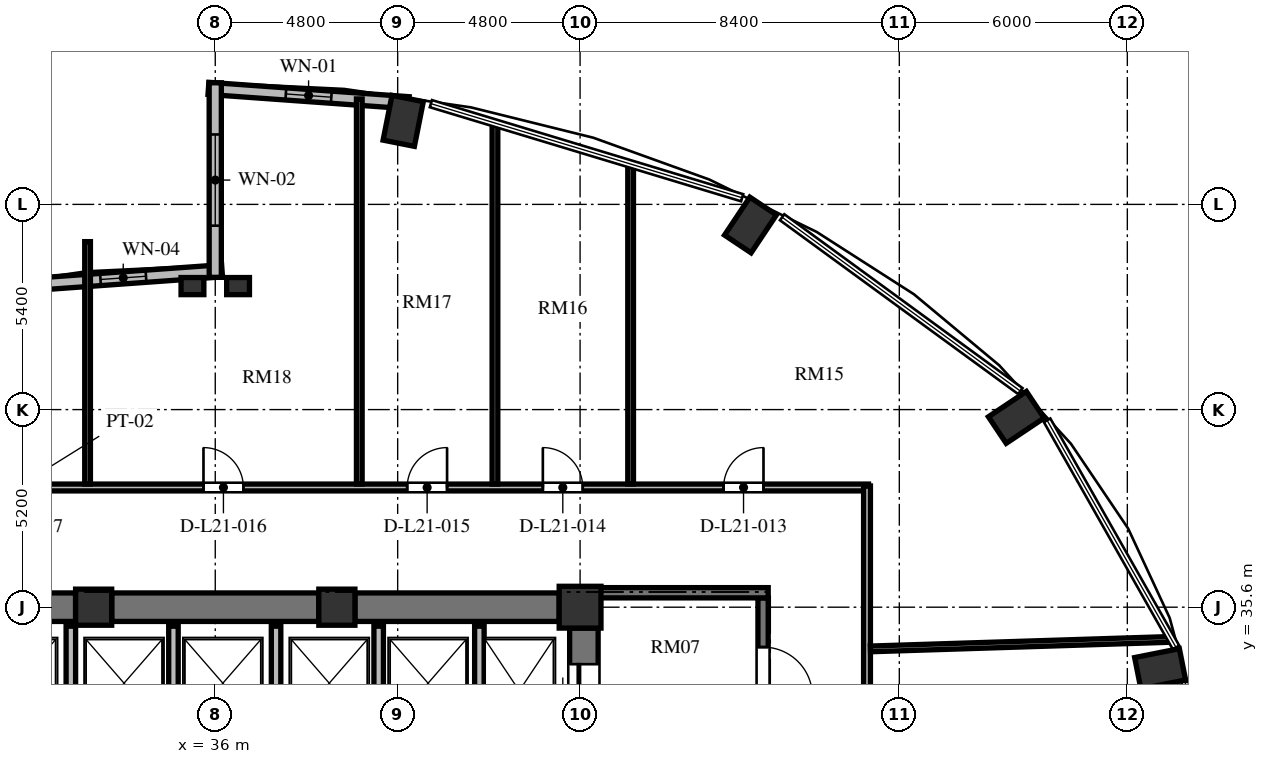
"""IFC4 building model, lengths in metres.
Left out: names, types, materials, properties, quantities, classifications, styles, units other than length and angle.
Written with IfcOpenShell. Run it as: python <this file> out.ifc"""

import sys

from ifc_helpers import new_model, si_unit, direction, frame, frame_2d, origin, origin_2d, place, context, subcontext, project, spatial, rectangle, extrude, element, fill, save


model = new_model("IFC4")
c1 = context("Model", 3, precision=1e-05, world=origin(), true_north=direction((0.0, 1.0)))
c2 = subcontext(c1, "Body", "Model", "MODEL_VIEW")
j1 = project(units=[si_unit("LENGTHUNIT", "METRE"), si_unit("PLANEANGLEUNIT", "RADIAN")], contexts=[c1])
p1 = place(None, origin())
s1 = spatial("IfcSite", under=j1, at=p1, CompositionType="ELEMENT")
p2 = place(p1, origin())
s2 = spatial("IfcBuilding", under=s1, at=p2, CompositionType="ELEMENT")
p3 = place(p2, frame((0.0, 0.0, 85.392)))
s3 = spatial("IfcBuildingStorey", under=s2, at=p3, CompositionType="ELEMENT", Elevation=85.392)
for number, where, z_axis, x_axis in (
    (1, (60.863, 33.98, 0.0), (0.0, 0.0, 1.0), (0.981, 0.195, 0.0)),
    (2, (57.078, 40.595, 0.0), (0.0, 0.0, 1.0), (0.831, 0.556, 0.0)),
    (3, (50.084, 45.657, 0.0), (0.0, 0.0, 1.0), (0.556, 0.831, 0.0)),
    (4, (40.946, 48.397, 0.0), (0.0, 0.0, 1.0), (0.195, 0.981, 0.0)),
):
    element("IfcColumn", number, at=place(p3, frame(where, z_axis=z_axis, x_axis=x_axis)), inside=s3, PredefinedType="COLUMN", context=c2, shape_type="SweptSolid", body=[
        extrude(rectangle(XDim=1.2, YDim=0.84, at=origin_2d()), origin(), (0.0, 0.0, 1.0), 3.648),
    ])
p4 = place(p3, frame((45.6, 35.6, 0.0), z_axis=(0.0, 0.0, 1.0), x_axis=(1.0, 0.0, 0.0)))
e5 = element("IfcColumn", 5, at=p4, inside=s3, PredefinedType="COLUMN", context=c2, shape_type="SweptSolid", body=[
    extrude(rectangle(XDim=1.1, YDim=1.1, at=origin_2d()), origin(), (0.0, 0.0, 1.0), 3.648),
])
for number, where, z_axis, x_axis in (
    (6, (39.2, 35.6, 0.0), (0.0, 0.0, 1.0), (1.0, 0.0, 0.0)),
    (7, (32.8, 35.6, 0.0), (0.0, 0.0, 1.0), (1.0, 0.0, 0.0)),
):
    element("IfcColumn", number, at=place(p3, frame(where, z_axis=z_axis, x_axis=x_axis)), inside=s3, PredefinedType="COLUMN", context=c2, shape_type="SweptSolid", body=[
        extrude(rectangle(XDim=0.95, YDim=0.95, at=origin_2d()), origin(), (0.0, 0.0, 1.0), 3.648),
    ])
for number, where, z_axis, x_axis in (
    (8, (35.4, 44.05, 0.0), (0.0, 0.0, 1.0), (1.0, 0.0, 0.0)),
    (9, (36.6, 44.05, 0.0), (0.0, 0.0, 1.0), (1.0, 0.0, 0.0)),
):
    element("IfcColumn", number, at=place(p3, frame(where, z_axis=z_axis, x_axis=x_axis)), inside=s3, PredefinedType="PILASTER", context=c2, shape_type="SweptSolid", body=[
        extrude(rectangle(XDim=0.6, YDim=0.45, at=origin_2d()), origin(), (0.0, 0.0, 1.0), 3.648),
    ])
p5 = place(p3, frame((45.7, 20.95, 0.0), z_axis=(0.0, 0.0, 1.0), x_axis=(0.0, 1.0, 0.0)))
e10 = element("IfcWall", 10, at=p5, inside=s3, PredefinedType="SHEAR", context=c2, shape_type="SweptSolid", body=[
    extrude(rectangle(XDim=14.1, YDim=0.75, at=frame_2d((7.05, 0.0))), origin(), (0.0, 0.0, 1.0), 3.648),
])
p6 = place(p5, frame((11.75, 0.0, 0.0)))
e11 = element("IfcOpeningElement", 11, at=p6, cuts=e10, PredefinedType="OPENING", context=c2, shape_type="SweptSolid", body=[
    extrude(rectangle(XDim=1.4, YDim=2.3, at=frame_2d((0.7, 1.15))), frame((0.0, 0.385, 0.0), z_axis=(0.0, -1.0, 0.0), x_axis=(1.0, 0.0, 0.0)), (0.0, 0.0, 1.0), 0.77),
])
p7 = place(p5, frame((0.95, 0.0, 0.0)))
e12 = element("IfcOpeningElement", 12, at=p7, cuts=e10, PredefinedType="OPENING", context=c2, shape_type="SweptSolid", body=[
    extrude(rectangle(XDim=1.4, YDim=2.3, at=frame_2d((0.7, 1.15))), frame((0.0, 0.385, 0.0), z_axis=(0.0, -1.0, 0.0), x_axis=(1.0, 0.0, 0.0)), (0.0, 0.0, 1.0), 0.77),
])
p8 = place(p3, frame((26.95, 35.6, 0.0), z_axis=(0.0, 0.0, 1.0), x_axis=(1.0, 0.0, 0.0)))
e13 = element("IfcWall", 13, at=p8, inside=s3, PredefinedType="SHEAR", context=c2, shape_type="SweptSolid", body=[
    extrude(rectangle(XDim=5.375, YDim=0.75, at=frame_2d((2.688, 0.0))), origin(), (0.0, 0.0, 1.0), 3.648),
])
p9 = place(p3, frame((33.275, 35.6, 0.0), z_axis=(0.0, 0.0, 1.0), x_axis=(1.0, 0.0, 0.0)))
e14 = element("IfcWall", 14, at=p9, inside=s3, PredefinedType="SHEAR", context=c2, shape_type="SweptSolid", body=[
    extrude(rectangle(XDim=5.45, YDim=0.75, at=frame_2d((2.725, 0.0))), origin(), (0.0, 0.0, 1.0), 3.648),
])
p10 = place(p3, frame((39.675, 35.6, 0.0), z_axis=(0.0, 0.0, 1.0), x_axis=(1.0, 0.0, 0.0)))
e15 = element("IfcWall", 15, at=p10, inside=s3, PredefinedType="SHEAR", context=c2, shape_type="SweptSolid", body=[
    extrude(rectangle(XDim=5.375, YDim=0.75, at=frame_2d((2.688, 0.0))), origin(), (0.0, 0.0, 1.0), 3.648),
])
p11 = place(p3, frame((41.091, 48.875, 0.0), z_axis=(0.0, 0.0, 1.0), x_axis=(-0.997432364291, 0.071614793619, 0.0)))
e16 = element("IfcWall", 16, at=p11, inside=s3, PredefinedType="SOLIDWALL", context=c2, shape_type="SweptSolid", body=[
    extrude(rectangle(XDim=5.284, YDim=0.32, at=frame_2d((2.642, 0.0))), origin(), (0.0, 0.0, 1.0), 3.428),
])
p12 = place(p11, frame((2.042, 0.0, 0.85)))
e17 = element("IfcOpeningElement", 17, at=p12, cuts=e16, PredefinedType="OPENING", context=c2, shape_type="SweptSolid", body=[
    extrude(rectangle(XDim=1.2, YDim=2.2, at=frame_2d((0.6, 1.1))), frame((0.0, 0.17, 0.0), z_axis=(0.0, -1.0, 0.0), x_axis=(1.0, 0.0, 0.0)), (0.0, 0.0, 1.0), 0.34),
])
p13 = place(p3, frame((36.179, 44.453, 0.0), z_axis=(0.0, 0.0, 1.0), x_axis=(-0.997431890304, -0.071621394884, 0.0)))
e18 = element("IfcWall", 18, at=p13, inside=s3, PredefinedType="SOLIDWALL", context=c2, shape_type="SweptSolid", body=[
    extrude(rectangle(XDim=5.284, YDim=0.32, at=frame_2d((2.642, 0.0))), origin(), (0.0, 0.0, 1.0), 3.428),
])
p14 = place(p13, frame((2.007, 0.0, 0.85)))
e19 = element("IfcOpeningElement", 19, at=p14, cuts=e18, PredefinedType="OPENING", context=c2, shape_type="SweptSolid", body=[
    extrude(rectangle(XDim=1.2, YDim=1.8, at=frame_2d((0.6, 0.9))), frame((0.0, 0.17, 0.0), z_axis=(0.0, -1.0, 0.0), x_axis=(1.0, 0.0, 0.0)), (0.0, 0.0, 1.0), 0.34),
])
p15 = place(p3, frame((36.0, 49.4, 0.0), z_axis=(0.0, 0.0, 1.0), x_axis=(0.0, -1.0, 0.0)))
e20 = element("IfcWall", 20, at=p15, inside=s3, PredefinedType="SOLIDWALL", context=c2, shape_type="SweptSolid", body=[
    extrude(rectangle(XDim=5.12, YDim=0.32, at=frame_2d((2.56, 0.0))), origin(), (0.0, 0.0, 1.0), 3.428),
])
p16 = place(p15, frame((1.36, 0.0, 0.84)))
e21 = element("IfcOpeningElement", 21, at=p16, cuts=e20, PredefinedType="OPENING", context=c2, shape_type="SweptSolid", body=[
    extrude(rectangle(XDim=2.4, YDim=2.04, at=frame_2d((1.2, 1.02))), frame((0.0, 0.17, 0.0), z_axis=(0.0, -1.0, 0.0), x_axis=(1.0, 0.0, 0.0)), (0.0, 0.0, 1.0), 0.34),
])
p17 = place(p3, frame((42.95, 31.92, 0.0), z_axis=(0.0, 0.0, 1.0), x_axis=(0.0, 1.0, 0.0)))
e22 = element("IfcWall", 22, at=p17, inside=s3, PredefinedType="SOLIDWALL", context=c2, shape_type="SweptSolid", body=[
    extrude(rectangle(XDim=3.18, YDim=0.25, at=frame_2d((1.59, 0.0))), origin(), (0.0, 0.0, 1.0), 3.428),
])
for number, where, z_axis, x_axis in (
    (23, (32.2, 32.42, 0.0), (0.0, 0.0, 1.0), (0.0, 1.0, 0.0)),
    (24, (34.9, 32.42, 0.0), (0.0, 0.0, 1.0), (0.0, 1.0, 0.0)),
    (25, (37.6, 32.42, 0.0), (0.0, 0.0, 1.0), (0.0, 1.0, 0.0)),
    (26, (40.3, 32.42, 0.0), (0.0, 0.0, 1.0), (0.0, 1.0, 0.0)),
):
    element("IfcWall", number, at=place(p3, frame(where, z_axis=z_axis, x_axis=x_axis)), inside=s3, PredefinedType="SOLIDWALL", context=c2, shape_type="SweptSolid", body=[
        extrude(rectangle(XDim=2.68, YDim=0.25, at=frame_2d((1.34, 0.0))), origin(), (0.0, 0.0, 1.0), 3.428),
    ])
p18 = place(p3, frame((50.415, 35.845, 0.0), z_axis=(0.0, 0.0, 1.0), x_axis=(0.0, -1.0, 0.0)))
e27 = element("IfcWall", 27, at=p18, inside=s3, PredefinedType="SHEAR", context=c2, shape_type="SweptSolid", body=[
    extrude(rectangle(XDim=15.825, YDim=0.27, at=frame_2d((7.913, 0.0))), origin(), (0.0, 0.0, 1.0), 3.648),
])
p19 = place(p18, frame((4.445, 0.0, 0.0)))
e28 = element("IfcOpeningElement", 28, at=p19, cuts=e27, PredefinedType="OPENING", context=c2, shape_type="SweptSolid", body=[
    extrude(rectangle(XDim=1.2, YDim=2.15, at=frame_2d((0.6, 1.075))), frame((0.0, 0.145, 0.0), z_axis=(0.0, -1.0, 0.0), x_axis=(1.0, 0.0, 0.0)), (0.0, 0.0, 1.0), 0.29),
])
p20 = place(p18, frame((1.295, 0.0, 0.0)))
e29 = element("IfcOpeningElement", 29, at=p20, cuts=e27, PredefinedType="OPENING", context=c2, shape_type="SweptSolid", body=[
    extrude(rectangle(XDim=1.3, YDim=2.2, at=frame_2d((0.65, 1.1))), frame((0.0, 0.145, 0.0), z_axis=(0.0, -1.0, 0.0), x_axis=(1.0, 0.0, 0.0)), (0.0, 0.0, 1.0), 0.29),
])
p21 = place(p18, frame((13.095, 0.0, 0.0)))
e30 = element("IfcOpeningElement", 30, at=p21, cuts=e27, PredefinedType="OPENING", context=c2, shape_type="SweptSolid", body=[
    extrude(rectangle(XDim=1.3, YDim=2.2, at=frame_2d((0.65, 1.1))), frame((0.0, 0.145, 0.0), z_axis=(0.0, -1.0, 0.0), x_axis=(1.0, 0.0, 0.0)), (0.0, 0.0, 1.0), 0.29),
])
p22 = place(p3, frame((46.075, 35.98, 0.0), z_axis=(0.0, 0.0, 1.0), x_axis=(1.0, 0.0, 0.0)))
e31 = element("IfcWall", 31, at=p22, inside=s3, PredefinedType="SHEAR", context=c2, shape_type="SweptSolid", body=[
    extrude(rectangle(XDim=4.475, YDim=0.27, at=frame_2d((2.238, 0.0))), origin(), (0.0, 0.0, 1.0), 3.648),
])
p23 = place(p3, frame((23.31, 38.75, 0.0), z_axis=(0.0, 0.0, 1.0), x_axis=(1.0, 0.0, 0.0)))
e32 = element("IfcWall", 32, at=p23, inside=s3, PredefinedType="PARTITIONING", context=c2, shape_type="SweptSolid", body=[
    extrude(rectangle(XDim=29.88, YDim=0.18, at=frame_2d((14.94, 0.0))), origin(), (0.0, 0.0, 1.0), 3.053),
])
p24 = place(p23, frame((26.066, 0.0, 0.0)))
e33 = element("IfcOpeningElement", 33, at=p24, cuts=e32, PredefinedType="OPENING", context=c2, shape_type="SweptSolid", body=[
    extrude(rectangle(XDim=1.05, YDim=2.15, at=frame_2d((0.525, 1.075))), frame((0.0, 0.1, 0.0), z_axis=(0.0, -1.0, 0.0), x_axis=(1.0, 0.0, 0.0)), (0.0, 0.0, 1.0), 0.2),
])
p25 = place(p23, frame((21.31, 0.0, 0.0)))
e34 = element("IfcOpeningElement", 34, at=p25, cuts=e32, PredefinedType="OPENING", context=c2, shape_type="SweptSolid", body=[
    extrude(rectangle(XDim=1.05, YDim=2.15, at=frame_2d((0.525, 1.075))), frame((0.0, 0.1, 0.0), z_axis=(0.0, -1.0, 0.0), x_axis=(1.0, 0.0, 0.0)), (0.0, 0.0, 1.0), 0.2),
])
p26 = place(p23, frame((17.74, 0.0, 0.0)))
e35 = element("IfcOpeningElement", 35, at=p26, cuts=e32, PredefinedType="OPENING", context=c2, shape_type="SweptSolid", body=[
    extrude(rectangle(XDim=1.05, YDim=2.15, at=frame_2d((0.525, 1.075))), frame((0.0, 0.1, 0.0), z_axis=(0.0, -1.0, 0.0), x_axis=(1.0, 0.0, 0.0)), (0.0, 0.0, 1.0), 0.2),
])
p27 = place(p23, frame((12.38, 0.0, 0.0)))
e36 = element("IfcOpeningElement", 36, at=p27, cuts=e32, PredefinedType="OPENING", context=c2, shape_type="SweptSolid", body=[
    extrude(rectangle(XDim=1.05, YDim=2.15, at=frame_2d((0.525, 1.075))), frame((0.0, 0.1, 0.0), z_axis=(0.0, -1.0, 0.0), x_axis=(1.0, 0.0, 0.0)), (0.0, 0.0, 1.0), 0.2),
])
p28 = place(p23, frame((7.02, 0.0, 0.0)))
e37 = element("IfcOpeningElement", 37, at=p28, cuts=e32, PredefinedType="OPENING", context=c2, shape_type="SweptSolid", body=[
    extrude(rectangle(XDim=1.05, YDim=2.15, at=frame_2d((0.525, 1.075))), frame((0.0, 0.1, 0.0), z_axis=(0.0, -1.0, 0.0), x_axis=(1.0, 0.0, 0.0)), (0.0, 0.0, 1.0), 0.2),
])
p29 = place(p23, frame((2.514, 0.0, 0.0)))
e38 = element("IfcOpeningElement", 38, at=p29, cuts=e32, PredefinedType="OPENING", context=c2, shape_type="SweptSolid", body=[
    extrude(rectangle(XDim=1.05, YDim=2.15, at=frame_2d((0.525, 1.075))), frame((0.0, 0.1, 0.0), z_axis=(0.0, -1.0, 0.0), x_axis=(1.0, 0.0, 0.0)), (0.0, 0.0, 1.0), 0.2),
])
p30 = place(p3, frame((53.15, 38.79, 0.0), z_axis=(0.0, 0.0, 1.0), x_axis=(0.0, -1.0, 0.0)))
e39 = element("IfcWall", 39, at=p30, inside=s3, PredefinedType="PARTITIONING", context=c2, shape_type="SweptSolid", body=[
    extrude(rectangle(XDim=9.43, YDim=0.18, at=frame_2d((4.715, 0.0))), origin(), (0.0, 0.0, 1.0), 3.428),
])
p31 = place(p3, frame((53.24, 34.502, 0.0), z_axis=(0.0, 0.0, 1.0), x_axis=(0.999499445349, 0.031636351679, 0.0)))
e40 = element("IfcWall", 40, at=p31, inside=s3, PredefinedType="PARTITIONING", context=c2, shape_type="SweptSolid", body=[
    extrude(rectangle(XDim=7.933, YDim=0.15, at=frame_2d((3.967, 0.0))), origin(), (0.0, 0.0, 1.0), 2.813),
])
p32 = place(p3, frame((32.64, 38.84, 0.0), z_axis=(0.0, 0.0, 1.0), x_axis=(0.0, 1.0, 0.0)))
e41 = element("IfcWall", 41, at=p32, inside=s3, PredefinedType="PARTITIONING", context=c2, shape_type="SweptSolid", body=[
    extrude(rectangle(XDim=6.38, YDim=0.15, at=frame_2d((3.19, 0.0))), origin(), (0.0, 0.0, 1.0), 3.428),
])
p33 = place(p3, frame((39.79, 38.84, 0.0), z_axis=(0.0, 0.0, 1.0), x_axis=(0.0, 1.0, 0.0)))
e42 = element("IfcWall", 42, at=p33, inside=s3, PredefinedType="PARTITIONING", context=c2, shape_type="SweptSolid", body=[
    extrude(rectangle(XDim=10.135, YDim=0.15, at=frame_2d((5.068, 0.0))), origin(), (0.0, 0.0, 1.0), 2.813),
])
p34 = place(p3, frame((43.36, 38.84, 0.0), z_axis=(0.0, 0.0, 1.0), x_axis=(0.0, 1.0, 0.0)))
e43 = element("IfcWall", 43, at=p34, inside=s3, PredefinedType="PARTITIONING", context=c2, shape_type="SweptSolid", body=[
    extrude(rectangle(XDim=9.487, YDim=0.15, at=frame_2d((4.744, 0.0))), origin(), (0.0, 0.0, 1.0), 3.428),
])
p35 = place(p3, frame((46.93, 38.84, 0.0), z_axis=(0.0, 0.0, 1.0), x_axis=(0.0, 1.0, 0.0)))
e44 = element("IfcWall", 44, at=p35, inside=s3, PredefinedType="PARTITIONING", context=c2, shape_type="SweptSolid", body=[
    extrude(rectangle(XDim=8.408, YDim=0.15, at=frame_2d((4.204, 0.0))), origin(), (0.0, 0.0, 1.0), 3.428),
])
p36 = place(p12, origin())
e45 = element("IfcWindow", 45, at=p36, inside=s3, PartitioningType="SINGLE_PANEL", PredefinedType="WINDOW", context=c2, shape_type="SweptSolid", body=[
    extrude(rectangle(XDim=1.2, YDim=2.2, at=frame_2d((0.6, 1.1))), frame((0.0, 0.03, 0.0), z_axis=(0.0, -1.0, 0.0), x_axis=(1.0, 0.0, 0.0)), (0.0, 0.0, 1.0), 0.06),
])
fill(e17, e45)
p37 = place(p14, origin())
e46 = element("IfcWindow", 46, at=p37, inside=s3, PartitioningType="SINGLE_PANEL", PredefinedType="WINDOW", context=c2, shape_type="SweptSolid", body=[
    extrude(rectangle(XDim=1.2, YDim=1.8, at=frame_2d((0.6, 0.9))), frame((0.0, 0.03, 0.0), z_axis=(0.0, -1.0, 0.0), x_axis=(1.0, 0.0, 0.0)), (0.0, 0.0, 1.0), 0.06),
])
fill(e19, e46)
p38 = place(p16, origin())
e47 = element("IfcWindow", 47, at=p38, inside=s3, PartitioningType="SINGLE_PANEL", PredefinedType="WINDOW", context=c2, shape_type="SweptSolid", body=[
    extrude(rectangle(XDim=2.4, YDim=2.04, at=frame_2d((1.2, 1.02))), frame((0.0, 0.03, 0.0), z_axis=(0.0, -1.0, 0.0), x_axis=(1.0, 0.0, 0.0)), (0.0, 0.0, 1.0), 0.06),
])
fill(e21, e47)
p39 = place(p6, origin())
e48 = element("IfcDoor", 48, at=p39, inside=s3, OperationType="SLIDING_TO_LEFT", PredefinedType="DOOR", context=c2, shape_type="SweptSolid", body=[
    extrude(rectangle(XDim=1.4, YDim=2.3, at=frame_2d((0.7, 1.15))), frame((0.0, 0.025, 0.0), z_axis=(0.0, -1.0, 0.0), x_axis=(1.0, 0.0, 0.0)), (0.0, 0.0, 1.0), 0.05),
])
fill(e11, e48)
p40 = place(p20, origin())
e49 = element("IfcDoor", 49, at=p40, inside=s3, OperationType="SINGLE_SWING_RIGHT", PredefinedType="DOOR", context=c2, shape_type="SweptSolid", body=[
    extrude(rectangle(XDim=1.3, YDim=2.2, at=frame_2d((0.65, 1.1))), frame((0.0, 0.025, 0.0), z_axis=(0.0, -1.0, 0.0), x_axis=(1.0, 0.0, 0.0)), (0.0, 0.0, 1.0), 0.05),
])
fill(e29, e49)
p41 = place(p24, origin())
e50 = element("IfcDoor", 50, at=p41, inside=s3, OperationType="SINGLE_SWING_RIGHT", PredefinedType="DOOR", context=c2, shape_type="SweptSolid", body=[
    extrude(rectangle(XDim=1.05, YDim=2.15, at=frame_2d((0.525, 1.075))), frame((0.0, 0.025, 0.0), z_axis=(0.0, -1.0, 0.0), x_axis=(1.0, 0.0, 0.0)), (0.0, 0.0, 1.0), 0.05),
])
fill(e33, e50)
p42 = place(p25, origin())
e51 = element("IfcDoor", 51, at=p42, inside=s3, OperationType="SINGLE_SWING_LEFT", PredefinedType="DOOR", context=c2, shape_type="SweptSolid", body=[
    extrude(rectangle(XDim=1.05, YDim=2.15, at=frame_2d((0.525, 1.075))), frame((0.0, 0.025, 0.0), z_axis=(0.0, -1.0, 0.0), x_axis=(1.0, 0.0, 0.0)), (0.0, 0.0, 1.0), 0.05),
])
fill(e34, e51)
p43 = place(p26, origin())
e52 = element("IfcDoor", 52, at=p43, inside=s3, OperationType="SINGLE_SWING_RIGHT", PredefinedType="DOOR", context=c2, shape_type="SweptSolid", body=[
    extrude(rectangle(XDim=1.05, YDim=2.15, at=frame_2d((0.525, 1.075))), frame((0.0, 0.025, 0.0), z_axis=(0.0, -1.0, 0.0), x_axis=(1.0, 0.0, 0.0)), (0.0, 0.0, 1.0), 0.05),
])
fill(e35, e52)
p44 = place(p27, origin())
e53 = element("IfcDoor", 53, at=p44, inside=s3, OperationType="SINGLE_SWING_LEFT", PredefinedType="DOOR", context=c2, shape_type="SweptSolid", body=[
    extrude(rectangle(XDim=1.05, YDim=2.15, at=frame_2d((0.525, 1.075))), frame((0.0, 0.025, 0.0), z_axis=(0.0, -1.0, 0.0), x_axis=(1.0, 0.0, 0.0)), (0.0, 0.0, 1.0), 0.05),
])
fill(e36, e53)
save(model, sys.argv[1])
